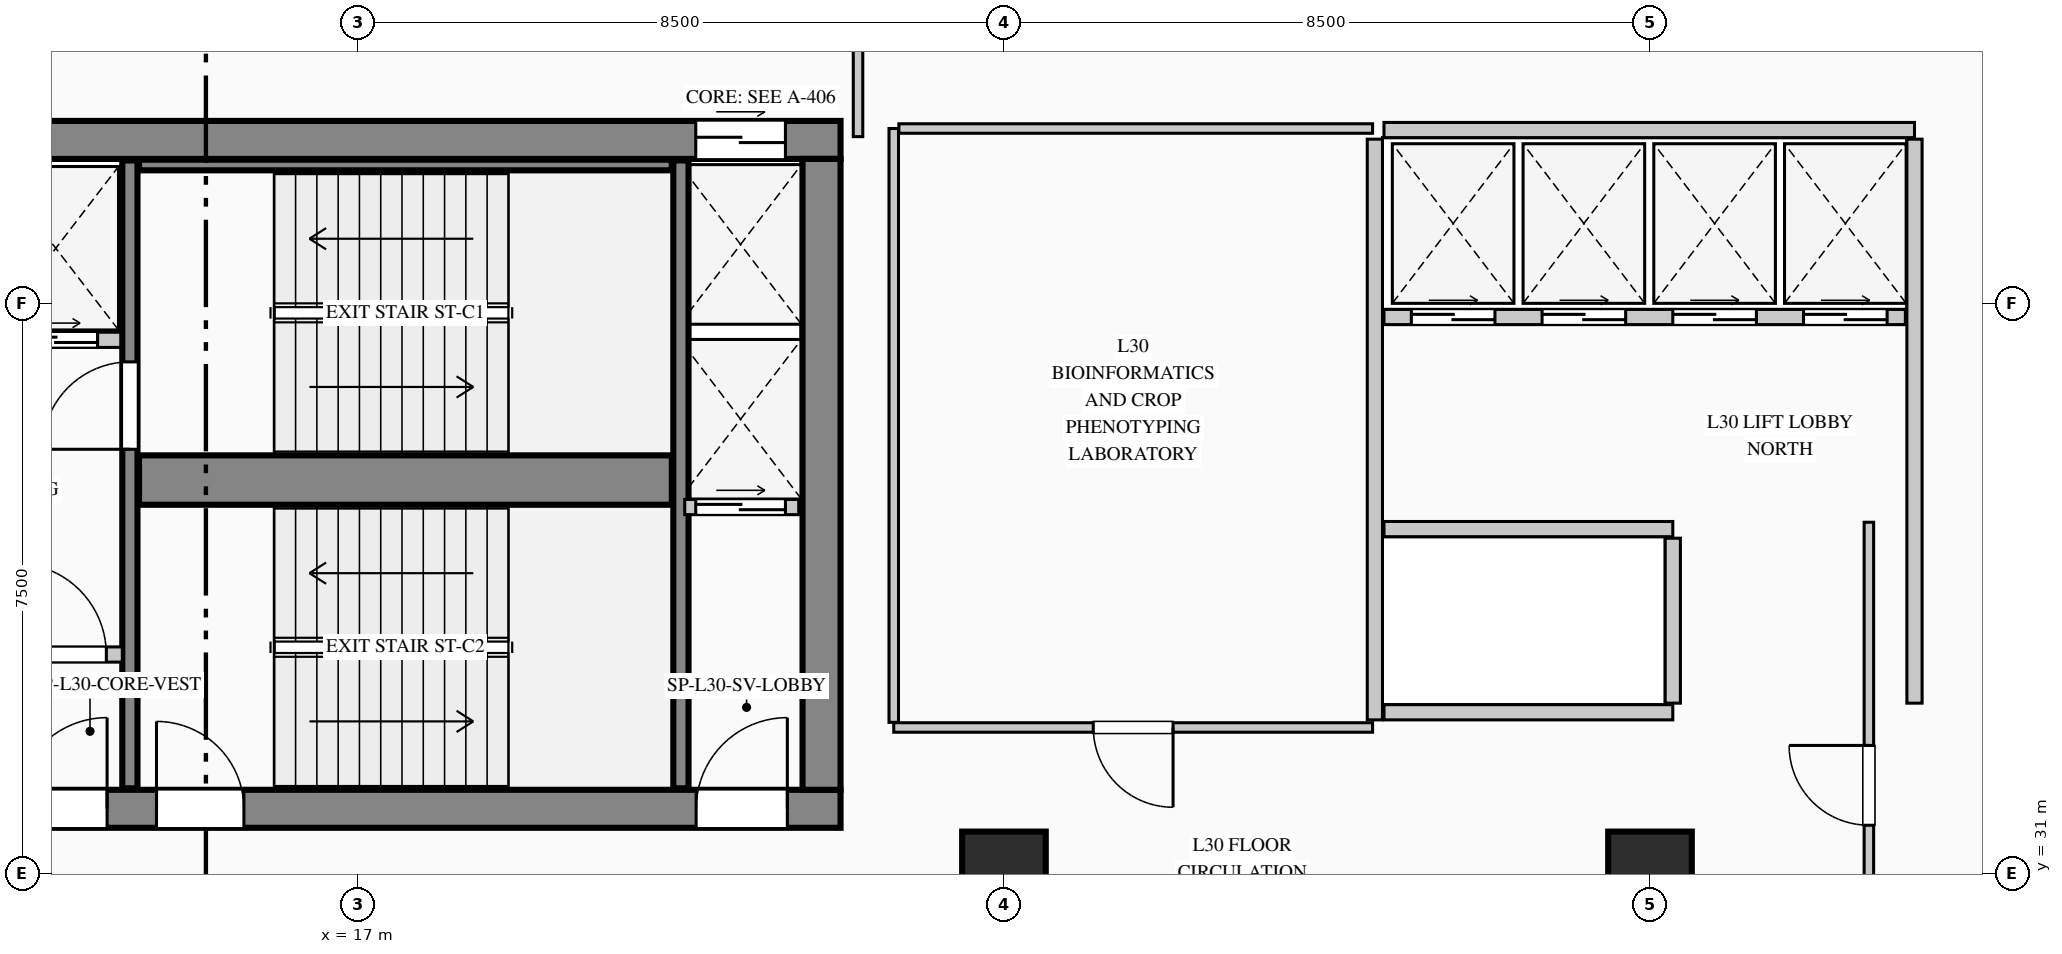
"""IFC4 building model, lengths in metres.
Left out: names, types, materials, properties, quantities, classifications, styles, units other than length and angle.
Written with IfcOpenShell. Run it as: python <this file> out.ifc"""

import sys

from ifc_helpers import new_model, si_unit, direction, frame, frame_2d, origin, origin_2d, place, context, subcontext, project, spatial, rectangle, extrude, element, fill, save


model = new_model("IFC4")
c1 = context("Model", 3, precision=1e-05, world=origin(), true_north=direction((0.0, 1.0)))
c2 = subcontext(c1, "Body", "Model", "MODEL_VIEW")
j1 = project(units=[si_unit("LENGTHUNIT", "METRE"), si_unit("PLANEANGLEUNIT", "RADIAN")], contexts=[c1])
p1 = place(None, origin())
s1 = spatial("IfcSite", under=j1, at=p1, CompositionType="ELEMENT")
p2 = place(p1, origin())
s2 = spatial("IfcBuilding", under=s1, at=p2, CompositionType="ELEMENT")
p3 = place(p2, frame((0.0, 0.0, 131.15)))
s3 = spatial("IfcBuildingStorey", under=s2, at=p3, CompositionType="ELEMENT", Elevation=131.15)
p4 = place(p3, frame((5.5, 40.65, 0.0), z_axis=(0.0, 0.0, 1.0), x_axis=(1.0, 0.0, 0.0)))
e1 = element("IfcWall", 1, at=p4, inside=s3, PredefinedType="SHEAR", context=c2, shape_type="SweptSolid", body=[
    extrude(rectangle(XDim=17.85, YDim=0.5, at=frame_2d((8.925, 0.0))), origin(), (0.0, 0.0, 1.0), 3.95),
])
p5 = place(p4, frame((15.945, 0.0, 0.0)))
e2 = element("IfcOpeningElement", 2, at=p5, cuts=e1, PredefinedType="OPENING", context=c2, shape_type="SweptSolid", body=[
    extrude(rectangle(XDim=1.18, YDim=2.25, at=frame_2d((0.59, 1.125))), frame((0.0, 0.26, 0.0), z_axis=(0.0, -1.0, 0.0), x_axis=(1.0, 0.0, 0.0)), (0.0, 0.0, 1.0), 0.52),
])
p6 = place(p3, frame((5.5, 31.85, 0.0), z_axis=(0.0, 0.0, 1.0), x_axis=(1.0, 0.0, 0.0)))
e3 = element("IfcWall", 3, at=p6, inside=s3, PredefinedType="SHEAR", context=c2, shape_type="SweptSolid", body=[
    extrude(rectangle(XDim=17.85, YDim=0.5, at=frame_2d((8.925, 0.0))), origin(), (0.0, 0.0, 1.0), 3.95),
])
p7 = place(p6, frame((3.15, 0.0, 0.0)))
e4 = element("IfcOpeningElement", 4, at=p7, cuts=e3, PredefinedType="OPENING", context=c2, shape_type="SweptSolid", body=[
    extrude(rectangle(XDim=1.2, YDim=2.2, at=frame_2d((0.6, 1.1))), frame((0.0, 0.26, 0.0), z_axis=(0.0, -1.0, 0.0), x_axis=(1.0, 0.0, 0.0)), (0.0, 0.0, 1.0), 0.52),
])
p8 = place(p6, frame((7.0, 0.0, 0.0)))
e5 = element("IfcOpeningElement", 5, at=p8, cuts=e3, PredefinedType="OPENING", context=c2, shape_type="SweptSolid", body=[
    extrude(rectangle(XDim=1.2, YDim=2.2, at=frame_2d((0.6, 1.1))), frame((0.0, 0.26, 0.0), z_axis=(0.0, -1.0, 0.0), x_axis=(1.0, 0.0, 0.0)), (0.0, 0.0, 1.0), 0.52),
])
p9 = place(p6, frame((8.85, 0.0, 0.0)))
e6 = element("IfcOpeningElement", 6, at=p9, cuts=e3, PredefinedType="OPENING", context=c2, shape_type="SweptSolid", body=[
    extrude(rectangle(XDim=1.15, YDim=2.2, at=frame_2d((0.575, 1.1))), frame((0.0, 0.26, 0.0), z_axis=(0.0, -1.0, 0.0), x_axis=(1.0, 0.0, 0.0)), (0.0, 0.0, 1.0), 0.52),
])
p10 = place(p6, frame((15.95, 0.0, 0.0)))
e7 = element("IfcOpeningElement", 7, at=p10, cuts=e3, PredefinedType="OPENING", context=c2, shape_type="SweptSolid", body=[
    extrude(rectangle(XDim=1.2, YDim=2.2, at=frame_2d((0.6, 1.1))), frame((0.0, 0.26, 0.0), z_axis=(0.0, -1.0, 0.0), x_axis=(1.0, 0.0, 0.0)), (0.0, 0.0, 1.0), 0.52),
])
p11 = place(p3, frame((23.1, 32.1, 0.0), z_axis=(0.0, 0.0, 1.0), x_axis=(0.0, 1.0, 0.0)))
e8 = element("IfcWall", 8, at=p11, inside=s3, PredefinedType="SHEAR", context=c2, shape_type="SweptSolid", body=[
    extrude(rectangle(XDim=8.3, YDim=0.5, at=frame_2d((4.15, 0.0))), origin(), (0.0, 0.0, 1.0), 3.95),
])
p12 = place(p3, frame((14.0, 32.12, 0.0), z_axis=(0.0, 0.0, 1.0), x_axis=(0.0, 1.0, 0.0)))
e9 = element("IfcWall", 9, at=p12, inside=s3, PredefinedType="SHEAR", context=c2, shape_type="SweptSolid", body=[
    extrude(rectangle(XDim=8.26, YDim=0.2, at=frame_2d((4.13, 0.0))), origin(), (0.0, 0.0, 1.0), 3.95),
])
p13 = place(p12, frame((4.46, 0.0, 0.0)))
e10 = element("IfcOpeningElement", 10, at=p13, cuts=e9, PredefinedType="OPENING", context=c2, shape_type="SweptSolid", body=[
    extrude(rectangle(XDim=1.15, YDim=2.2, at=frame_2d((0.575, 1.1))), frame((0.0, 0.11, 0.0), z_axis=(0.0, -1.0, 0.0), x_axis=(1.0, 0.0, 0.0)), (0.0, 0.0, 1.0), 0.22),
])
p14 = place(p3, frame((14.12, 36.175, 0.0), z_axis=(0.0, 0.0, 1.0), x_axis=(1.0, 0.0, 0.0)))
e11 = element("IfcWall", 11, at=p14, inside=s3, PredefinedType="SHEAR", context=c2, shape_type="SweptSolid", body=[
    extrude(rectangle(XDim=7.01, YDim=0.65, at=frame_2d((3.505, 0.0))), origin(), (0.0, 0.0, 1.0), 3.95),
])
p15 = place(p3, frame((21.25, 32.12, 0.0), z_axis=(0.0, 0.0, 1.0), x_axis=(0.0, 1.0, 0.0)))
e12 = element("IfcWall", 12, at=p15, inside=s3, PredefinedType="SHEAR", context=c2, shape_type="SweptSolid", body=[
    extrude(rectangle(XDim=8.26, YDim=0.2, at=frame_2d((4.13, 0.0))), origin(), (0.0, 0.0, 1.0), 3.95),
])
p16 = place(p3, frame((14.12, 40.32, 0.0), z_axis=(0.0, 0.0, 1.0), x_axis=(1.0, 0.0, 0.0)))
e13 = element("IfcWall", 13, at=p16, inside=s3, PredefinedType="SHEAR", context=c2, shape_type="SweptSolid", body=[
    extrude(rectangle(XDim=7.01, YDim=0.14, at=frame_2d((3.505, 0.0))), origin(), (0.0, 0.0, 1.0), 3.95),
])
for number, where, z_axis, x_axis in (
    (14, (25.5, 31.0, 0.0), (0.0, 0.0, 1.0), (1.0, 0.0, 0.0)),
    (15, (34.0, 31.0, 0.0), (0.0, 0.0, 1.0), (1.0, 0.0, 0.0)),
):
    element("IfcColumn", number, at=place(p3, frame(where, z_axis=z_axis, x_axis=x_axis)), inside=s3, PredefinedType="COLUMN", context=c2, shape_type="SweptSolid", body=[
        extrude(rectangle(XDim=1.1, YDim=1.1, at=origin_2d()), origin(), (0.0, 0.0, 1.0), 3.95),
    ])
p17 = place(p3, frame((10.34, 38.02, 0.0), z_axis=(0.0, 0.0, 1.0), x_axis=(1.0, 0.0, 0.0)))
e16 = element("IfcWall", 16, at=p17, inside=s3, PredefinedType="PARTITIONING", context=c2, shape_type="SweptSolid", body=[
    extrude(rectangle(XDim=3.54, YDim=0.2, at=frame_2d((1.77, 0.0))), origin(), (0.0, 0.0, 1.0), 3.69),
])
p18 = place(p17, frame((0.285, 0.0, 0.0)))
e17 = element("IfcOpeningElement", 17, at=p18, cuts=e16, PredefinedType="OPENING", context=c2, shape_type="SweptSolid", body=[
    extrude(rectangle(XDim=1.1, YDim=2.2, at=frame_2d((0.55, 1.1))), frame((0.0, 0.11, 0.0), z_axis=(0.0, -1.0, 0.0), x_axis=(1.0, 0.0, 0.0)), (0.0, 0.0, 1.0), 0.22),
])
p19 = place(p17, frame((2.135, 0.0, 0.0)))
e18 = element("IfcOpeningElement", 18, at=p19, cuts=e16, PredefinedType="OPENING", context=c2, shape_type="SweptSolid", body=[
    extrude(rectangle(XDim=1.1, YDim=2.2, at=frame_2d((0.55, 1.1))), frame((0.0, 0.11, 0.0), z_axis=(0.0, -1.0, 0.0), x_axis=(1.0, 0.0, 0.0)), (0.0, 0.0, 1.0), 0.22),
])
p20 = place(p3, frame((10.34, 33.88, 0.0), z_axis=(0.0, 0.0, 1.0), x_axis=(1.0, 0.0, 0.0)))
e19 = element("IfcWall", 19, at=p20, inside=s3, PredefinedType="PARTITIONING", context=c2, shape_type="SweptSolid", body=[
    extrude(rectangle(XDim=3.56, YDim=0.2, at=frame_2d((1.78, 0.0))), origin(), (0.0, 0.0, 1.0), 3.69),
])
p21 = place(p20, frame((2.15, 0.0, 0.0)))
e20 = element("IfcOpeningElement", 20, at=p21, cuts=e19, PredefinedType="OPENING", context=c2, shape_type="SweptSolid", body=[
    extrude(rectangle(XDim=1.2, YDim=2.2, at=frame_2d((0.6, 1.1))), frame((0.0, 0.11, 0.0), z_axis=(0.0, -1.0, 0.0), x_axis=(1.0, 0.0, 0.0)), (0.0, 0.0, 1.0), 0.22),
])
p22 = place(p3, frame((21.3, 35.82, 0.0), z_axis=(0.0, 0.0, 1.0), x_axis=(1.0, 0.0, 0.0)))
e21 = element("IfcWall", 21, at=p22, inside=s3, PredefinedType="PARTITIONING", context=c2, shape_type="SweptSolid", body=[
    extrude(rectangle(XDim=1.5, YDim=0.2, at=frame_2d((0.75, 0.0))), origin(), (0.0, 0.0, 1.0), 3.69),
])
p23 = place(p22, frame((0.145, 0.0, 0.0)))
e22 = element("IfcOpeningElement", 22, at=p23, cuts=e21, PredefinedType="OPENING", context=c2, shape_type="SweptSolid", body=[
    extrude(rectangle(XDim=1.18, YDim=2.25, at=frame_2d((0.59, 1.125))), frame((0.0, 0.11, 0.0), z_axis=(0.0, -1.0, 0.0), x_axis=(1.0, 0.0, 0.0)), (0.0, 0.0, 1.0), 0.22),
])
p24 = place(p3, frame((30.38, 33.02, 0.0), z_axis=(0.0, 0.0, 1.0), x_axis=(0.0, 1.0, 0.0)))
e23 = element("IfcWall", 23, at=p24, inside=s3, PredefinedType="PARTITIONING", context=c2, shape_type="SweptSolid", body=[
    extrude(rectangle(XDim=7.64, YDim=0.2, at=frame_2d((3.82, 0.0))), origin(), (0.0, 0.0, 1.0), 3.69),
])
p25 = place(p3, frame((30.5, 40.78, 0.0), z_axis=(0.0, 0.0, 1.0), x_axis=(1.0, 0.0, 0.0)))
e24 = element("IfcWall", 24, at=p25, inside=s3, PredefinedType="PARTITIONING", context=c2, shape_type="SweptSolid", body=[
    extrude(rectangle(XDim=6.98, YDim=0.2, at=frame_2d((3.49, 0.0))), origin(), (0.0, 0.0, 1.0), 3.69),
])
p26 = place(p3, frame((37.48, 33.24, 0.0), z_axis=(0.0, 0.0, 1.0), x_axis=(0.0, 1.0, 0.0)))
e25 = element("IfcWall", 25, at=p26, inside=s3, PredefinedType="PARTITIONING", context=c2, shape_type="SweptSolid", body=[
    extrude(rectangle(XDim=7.42, YDim=0.2, at=frame_2d((3.71, 0.0))), origin(), (0.0, 0.0, 1.0), 3.69),
])
p27 = place(p3, frame((30.5, 38.32, 0.0), z_axis=(0.0, 0.0, 1.0), x_axis=(1.0, 0.0, 0.0)))
e26 = element("IfcWall", 26, at=p27, inside=s3, PredefinedType="PARTITIONING", context=c2, shape_type="SweptSolid", body=[
    extrude(rectangle(XDim=6.86, YDim=0.2, at=frame_2d((3.43, 0.0))), origin(), (0.0, 0.0, 1.0), 3.69),
])
p28 = place(p27, frame((0.36, 0.0, 0.0)))
e27 = element("IfcOpeningElement", 27, at=p28, cuts=e26, PredefinedType="OPENING", context=c2, shape_type="SweptSolid", body=[
    extrude(rectangle(XDim=1.1, YDim=2.2, at=frame_2d((0.55, 1.1))), frame((0.0, 0.11, 0.0), z_axis=(0.0, -1.0, 0.0), x_axis=(1.0, 0.0, 0.0)), (0.0, 0.0, 1.0), 0.22),
])
p29 = place(p27, frame((2.08, 0.0, 0.0)))
e28 = element("IfcOpeningElement", 28, at=p29, cuts=e26, PredefinedType="OPENING", context=c2, shape_type="SweptSolid", body=[
    extrude(rectangle(XDim=1.1, YDim=2.2, at=frame_2d((0.55, 1.1))), frame((0.0, 0.11, 0.0), z_axis=(0.0, -1.0, 0.0), x_axis=(1.0, 0.0, 0.0)), (0.0, 0.0, 1.0), 0.22),
])
p30 = place(p27, frame((3.8, 0.0, 0.0)))
e29 = element("IfcOpeningElement", 29, at=p30, cuts=e26, PredefinedType="OPENING", context=c2, shape_type="SweptSolid", body=[
    extrude(rectangle(XDim=1.1, YDim=2.2, at=frame_2d((0.55, 1.1))), frame((0.0, 0.11, 0.0), z_axis=(0.0, -1.0, 0.0), x_axis=(1.0, 0.0, 0.0)), (0.0, 0.0, 1.0), 0.22),
])
p31 = place(p27, frame((5.52, 0.0, 0.0)))
e30 = element("IfcOpeningElement", 30, at=p31, cuts=e26, PredefinedType="OPENING", context=c2, shape_type="SweptSolid", body=[
    extrude(rectangle(XDim=1.1, YDim=2.2, at=frame_2d((0.55, 1.1))), frame((0.0, 0.11, 0.0), z_axis=(0.0, -1.0, 0.0), x_axis=(1.0, 0.0, 0.0)), (0.0, 0.0, 1.0), 0.22),
])
for number, where, z_axis, x_axis in (
    (31, (30.5, 35.53, 0.0), (0.0, 0.0, 1.0), (1.0, 0.0, 0.0)),
    (32, (30.5, 33.12, 0.0), (0.0, 0.0, 1.0), (1.0, 0.0, 0.0)),
):
    element("IfcWall", number, at=place(p3, frame(where, z_axis=z_axis, x_axis=x_axis)), inside=s3, PredefinedType="PARTITIONING", context=c2, shape_type="SweptSolid", body=[
        extrude(rectangle(XDim=3.8, YDim=0.2, at=frame_2d((1.9, 0.0))), origin(), (0.0, 0.0, 1.0), 3.69),
    ])
p32 = place(p3, frame((34.3, 33.24, 0.0), z_axis=(0.0, 0.0, 1.0), x_axis=(0.0, 1.0, 0.0)))
e33 = element("IfcWall", 33, at=p32, inside=s3, PredefinedType="PARTITIONING", context=c2, shape_type="SweptSolid", body=[
    extrude(rectangle(XDim=2.17, YDim=0.2, at=frame_2d((1.085, 0.0))), origin(), (0.0, 0.0, 1.0), 3.69),
])
p33 = place(p3, frame((30.35, 32.92, 0.0), z_axis=(0.0, 0.0, 1.0), x_axis=(-1.0, 0.0, 0.0)))
e34 = element("IfcWall", 34, at=p33, inside=s3, PredefinedType="PARTITIONING", context=c2, shape_type="SweptSolid", body=[
    extrude(rectangle(XDim=6.3, YDim=0.125, at=frame_2d((3.15, 0.0))), origin(), (0.0, 0.0, 1.0), 3.69),
])
p34 = place(p33, frame((2.625, 0.0, 0.0)))
e35 = element("IfcOpeningElement", 35, at=p34, cuts=e34, PredefinedType="OPENING", context=c2, shape_type="SweptSolid", body=[
    extrude(rectangle(XDim=1.05, YDim=2.15, at=frame_2d((0.525, 1.075))), frame((0.0, 0.073, 0.0), z_axis=(0.0, -1.0, 0.0), x_axis=(1.0, 0.0, 0.0)), (0.0, 0.0, 1.0), 0.145),
])
p35 = place(p3, frame((24.05, 32.988, 0.0), z_axis=(0.0, 0.0, 1.0), x_axis=(0.0, 1.0, 0.0)))
e36 = element("IfcWall", 36, at=p35, inside=s3, PredefinedType="PARTITIONING", context=c2, shape_type="SweptSolid", body=[
    extrude(rectangle(XDim=7.812, YDim=0.125, at=frame_2d((3.906, 0.0))), origin(), (0.0, 0.0, 1.0), 3.69),
])
p36 = place(p3, frame((24.117, 40.8, 0.0), z_axis=(0.0, 0.0, 1.0), x_axis=(1.0, 0.0, 0.0)))
e37 = element("IfcWall", 37, at=p36, inside=s3, PredefinedType="PARTITIONING", context=c2, shape_type="SweptSolid", body=[
    extrude(rectangle(XDim=6.233, YDim=0.125, at=frame_2d((3.116, 0.0))), origin(), (0.0, 0.0, 1.0), 3.69),
])
p37 = place(p3, frame((23.58, 40.693, 0.0), z_axis=(0.0, 0.0, 1.0), x_axis=(0.0, 1.0, 0.0)))
e38 = element("IfcWall", 38, at=p37, inside=s3, PredefinedType="PARTITIONING", context=c2, shape_type="SweptSolid", body=[
    extrude(rectangle(XDim=2.572, YDim=0.125, at=frame_2d((1.286, 0.0))), origin(), (0.0, 0.0, 1.0), 3.69),
])
p38 = place(p3, frame((36.88, 28.698, 0.0), z_axis=(0.0, 0.0, 1.0), x_axis=(0.0, 1.0, 0.0)))
e39 = element("IfcWall", 39, at=p38, inside=s3, PredefinedType="PARTITIONING", context=c2, shape_type="SweptSolid", body=[
    extrude(rectangle(XDim=6.923, YDim=0.125, at=frame_2d((3.461, 0.0))), origin(), (0.0, 0.0, 1.0), 3.69),
])
p39 = place(p38, frame((2.936, 0.0, 0.0)))
e40 = element("IfcOpeningElement", 40, at=p39, cuts=e39, PredefinedType="OPENING", context=c2, shape_type="SweptSolid", body=[
    extrude(rectangle(XDim=1.05, YDim=2.15, at=frame_2d((0.525, 1.075))), frame((0.0, 0.073, 0.0), z_axis=(0.0, -1.0, 0.0), x_axis=(1.0, 0.0, 0.0)), (0.0, 0.0, 1.0), 0.145),
])
p40 = place(p8, origin())
e41 = element("IfcDoor", 41, at=p40, inside=s3, OperationType="SINGLE_SWING_RIGHT", PredefinedType="DOOR", context=c2, shape_type="SweptSolid", body=[
    extrude(rectangle(XDim=1.2, YDim=2.2, at=frame_2d((0.6, 1.1))), frame((0.0, 0.025, 0.0), z_axis=(0.0, -1.0, 0.0), x_axis=(1.0, 0.0, 0.0)), (0.0, 0.0, 1.0), 0.05),
])
fill(e5, e41)
p41 = place(p9, origin())
e42 = element("IfcDoor", 42, at=p41, inside=s3, OperationType="SINGLE_SWING_LEFT", PredefinedType="DOOR", context=c2, shape_type="SweptSolid", body=[
    extrude(rectangle(XDim=1.15, YDim=2.2, at=frame_2d((0.575, 1.1))), frame((0.0, 0.025, 0.0), z_axis=(0.0, -1.0, 0.0), x_axis=(1.0, 0.0, 0.0)), (0.0, 0.0, 1.0), 0.05),
])
fill(e6, e42)
p42 = place(p10, origin())
e43 = element("IfcDoor", 43, at=p42, inside=s3, OperationType="SINGLE_SWING_RIGHT", PredefinedType="DOOR", context=c2, shape_type="SweptSolid", body=[
    extrude(rectangle(XDim=1.2, YDim=2.2, at=frame_2d((0.6, 1.1))), frame((0.0, 0.025, 0.0), z_axis=(0.0, -1.0, 0.0), x_axis=(1.0, 0.0, 0.0)), (0.0, 0.0, 1.0), 0.05),
])
fill(e7, e43)
p43 = place(p21, origin())
e44 = element("IfcDoor", 44, at=p43, inside=s3, OperationType="SINGLE_SWING_LEFT", PredefinedType="DOOR", context=c2, shape_type="SweptSolid", body=[
    extrude(rectangle(XDim=1.2, YDim=2.2, at=frame_2d((0.6, 1.1))), frame((0.0, 0.025, 0.0), z_axis=(0.0, -1.0, 0.0), x_axis=(1.0, 0.0, 0.0)), (0.0, 0.0, 1.0), 0.05),
])
fill(e20, e44)
p44 = place(p13, origin())
e45 = element("IfcDoor", 45, at=p44, inside=s3, OperationType="SINGLE_SWING_LEFT", PredefinedType="DOOR", context=c2, shape_type="SweptSolid", body=[
    extrude(rectangle(XDim=1.15, YDim=2.2, at=frame_2d((0.575, 1.1))), frame((0.0, 0.025, 0.0), z_axis=(0.0, -1.0, 0.0), x_axis=(1.0, 0.0, 0.0)), (0.0, 0.0, 1.0), 0.05),
])
fill(e10, e45)
p45 = place(p19, origin())
e46 = element("IfcDoor", 46, at=p45, inside=s3, OperationType="DOUBLE_DOOR_SLIDING", PredefinedType="DOOR", context=c2, shape_type="SweptSolid", body=[
    extrude(rectangle(XDim=1.1, YDim=2.2, at=frame_2d((0.55, 1.1))), frame((0.0, 0.025, 0.0), z_axis=(0.0, -1.0, 0.0), x_axis=(1.0, 0.0, 0.0)), (0.0, 0.0, 1.0), 0.05),
])
fill(e18, e46)
p46 = place(p5, origin())
e47 = element("IfcDoor", 47, at=p46, inside=s3, OperationType="DOUBLE_DOOR_SLIDING", PredefinedType="DOOR", context=c2, shape_type="SweptSolid", body=[
    extrude(rectangle(XDim=1.18, YDim=2.25, at=frame_2d((0.59, 1.125))), frame((0.0, 0.025, 0.0), z_axis=(0.0, -1.0, 0.0), x_axis=(1.0, 0.0, 0.0)), (0.0, 0.0, 1.0), 0.05),
])
fill(e2, e47)
p47 = place(p23, origin())
e48 = element("IfcDoor", 48, at=p47, inside=s3, OperationType="DOUBLE_DOOR_SLIDING", PredefinedType="DOOR", context=c2, shape_type="SweptSolid", body=[
    extrude(rectangle(XDim=1.18, YDim=2.25, at=frame_2d((0.59, 1.125))), frame((0.0, 0.025, 0.0), z_axis=(0.0, -1.0, 0.0), x_axis=(1.0, 0.0, 0.0)), (0.0, 0.0, 1.0), 0.05),
])
fill(e22, e48)
p48 = place(p28, origin())
e49 = element("IfcDoor", 49, at=p48, inside=s3, OperationType="DOUBLE_DOOR_SLIDING", PredefinedType="DOOR", context=c2, shape_type="SweptSolid", body=[
    extrude(rectangle(XDim=1.1, YDim=2.2, at=frame_2d((0.55, 1.1))), frame((0.0, 0.025, 0.0), z_axis=(0.0, -1.0, 0.0), x_axis=(1.0, 0.0, 0.0)), (0.0, 0.0, 1.0), 0.05),
])
fill(e27, e49)
p49 = place(p29, origin())
e50 = element("IfcDoor", 50, at=p49, inside=s3, OperationType="DOUBLE_DOOR_SLIDING", PredefinedType="DOOR", context=c2, shape_type="SweptSolid", body=[
    extrude(rectangle(XDim=1.1, YDim=2.2, at=frame_2d((0.55, 1.1))), frame((0.0, 0.025, 0.0), z_axis=(0.0, -1.0, 0.0), x_axis=(1.0, 0.0, 0.0)), (0.0, 0.0, 1.0), 0.05),
])
fill(e28, e50)
p50 = place(p30, origin())
e51 = element("IfcDoor", 51, at=p50, inside=s3, OperationType="DOUBLE_DOOR_SLIDING", PredefinedType="DOOR", context=c2, shape_type="SweptSolid", body=[
    extrude(rectangle(XDim=1.1, YDim=2.2, at=frame_2d((0.55, 1.1))), frame((0.0, 0.025, 0.0), z_axis=(0.0, -1.0, 0.0), x_axis=(1.0, 0.0, 0.0)), (0.0, 0.0, 1.0), 0.05),
])
fill(e29, e51)
p51 = place(p31, origin())
e52 = element("IfcDoor", 52, at=p51, inside=s3, OperationType="DOUBLE_DOOR_SLIDING", PredefinedType="DOOR", context=c2, shape_type="SweptSolid", body=[
    extrude(rectangle(XDim=1.1, YDim=2.2, at=frame_2d((0.55, 1.1))), frame((0.0, 0.025, 0.0), z_axis=(0.0, -1.0, 0.0), x_axis=(1.0, 0.0, 0.0)), (0.0, 0.0, 1.0), 0.05),
])
fill(e30, e52)
p52 = place(p34, origin())
e53 = element("IfcDoor", 53, at=p52, inside=s3, OperationType="SINGLE_SWING_LEFT", PredefinedType="DOOR", context=c2, shape_type="SweptSolid", body=[
    extrude(rectangle(XDim=1.05, YDim=2.15, at=frame_2d((0.525, 1.075))), frame((0.0, 0.025, 0.0), z_axis=(0.0, -1.0, 0.0), x_axis=(1.0, 0.0, 0.0)), (0.0, 0.0, 1.0), 0.05),
])
fill(e35, e53)
p53 = place(p39, origin())
e54 = element("IfcDoor", 54, at=p53, inside=s3, OperationType="SINGLE_SWING_RIGHT", PredefinedType="DOOR", context=c2, shape_type="SweptSolid", body=[
    extrude(rectangle(XDim=1.05, YDim=2.15, at=frame_2d((0.525, 1.075))), frame((0.0, 0.025, 0.0), z_axis=(0.0, -1.0, 0.0), x_axis=(1.0, 0.0, 0.0)), (0.0, 0.0, 1.0), 0.05),
])
fill(e40, e54)
save(model, sys.argv[1])
